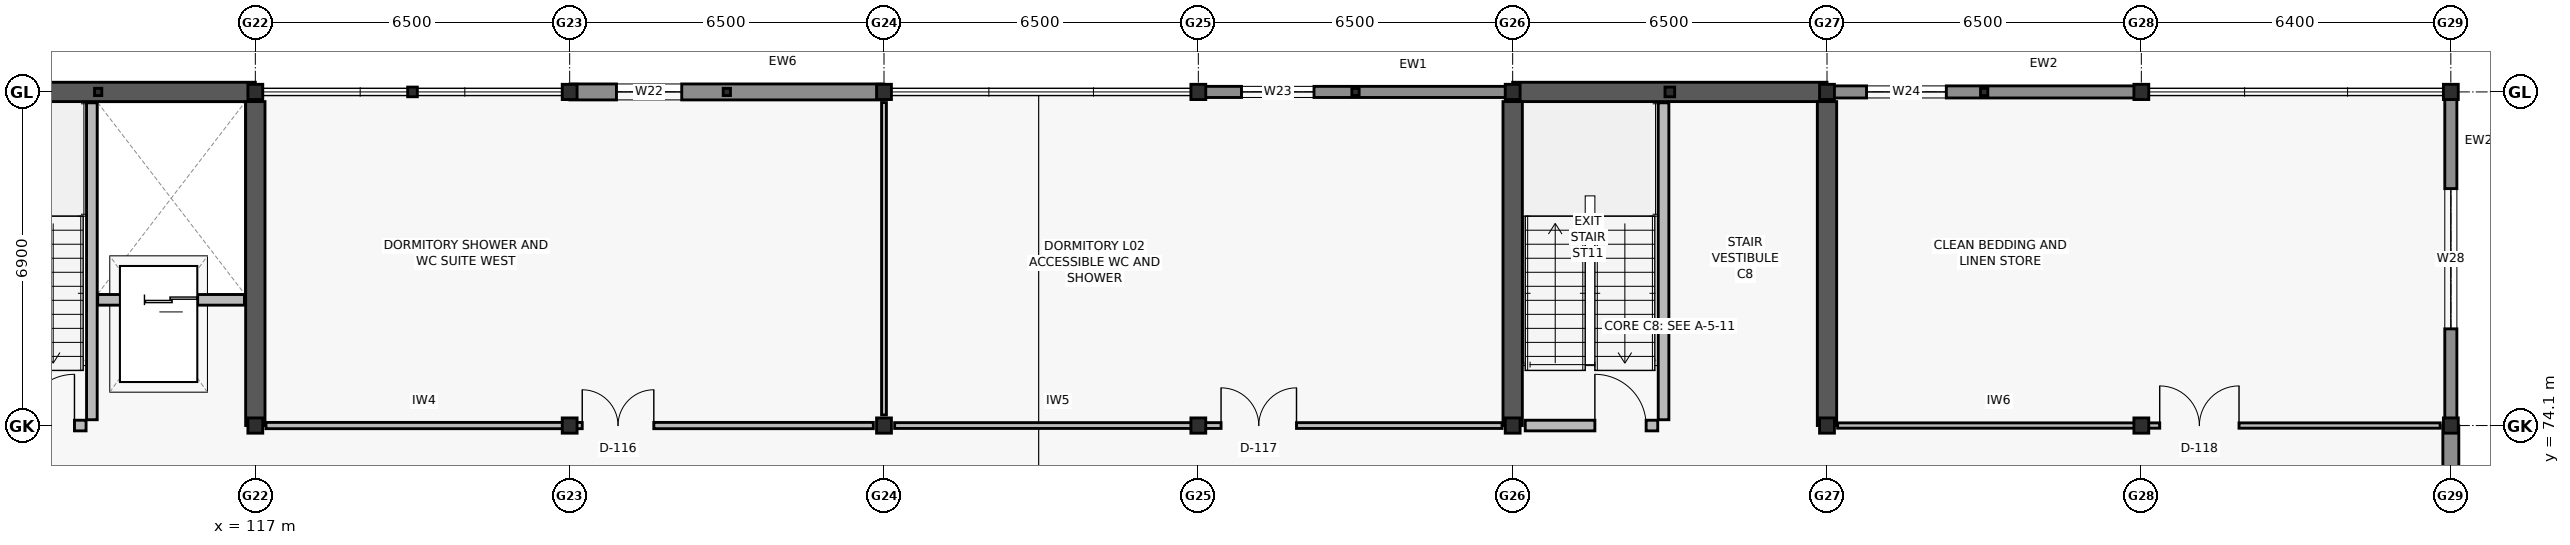
"""IFC4 building model, lengths in metres.
Left out: names, types, materials, properties, quantities, classifications, styles, units other than length and angle.
Written with IfcOpenShell. Run it as: python <this file> out.ifc"""

import sys

from ifc_helpers import new_model, si_unit, direction, frame, frame_2d, origin, origin_2d, place, context, subcontext, project, spatial, rectangle, hollow_rectangle, i_section, extrude, element, fill, save


model = new_model("IFC4")
c1 = context("Model", 3, precision=1e-05, world=origin(), true_north=direction((0.0, 1.0)))
c2 = subcontext(c1, "Body", "Model", "MODEL_VIEW")
j1 = project(units=[si_unit("LENGTHUNIT", "METRE"), si_unit("PLANEANGLEUNIT", "RADIAN")], contexts=[c1])
p1 = place(None, origin())
s1 = spatial("IfcSite", under=j1, at=p1, CompositionType="ELEMENT")
p2 = place(p1, origin())
s2 = spatial("IfcBuilding", under=s1, at=p2, CompositionType="ELEMENT")
p3 = place(p2, frame((0.0, 0.0, 9.6)))
s3 = spatial("IfcBuildingStorey", under=s2, at=p3, CompositionType="ELEMENT", Elevation=9.6)
for number, where, z_axis, x_axis in (
    (1, (117.0, 74.1, 0.0), (0.0, 0.0, 1.0), (1.0, 0.0, 0.0)),
    (2, (117.0, 81.0, 0.0), (0.0, 0.0, 1.0), (1.0, 0.0, 0.0)),
    (3, (123.5, 74.1, 0.0), (0.0, 0.0, 1.0), (1.0, 0.0, 0.0)),
    (4, (123.5, 81.0, 0.0), (0.0, 0.0, 1.0), (1.0, 0.0, 0.0)),
    (5, (130.0, 74.1, 0.0), (0.0, 0.0, 1.0), (1.0, 0.0, 0.0)),
    (6, (130.0, 81.0, 0.0), (0.0, 0.0, 1.0), (1.0, 0.0, 0.0)),
    (7, (136.5, 74.1, 0.0), (0.0, 0.0, 1.0), (1.0, 0.0, 0.0)),
    (8, (136.5, 81.0, 0.0), (0.0, 0.0, 1.0), (1.0, 0.0, 0.0)),
    (9, (143.0, 74.1, 0.0), (0.0, 0.0, 1.0), (1.0, 0.0, 0.0)),
    (10, (143.0, 81.0, 0.0), (0.0, 0.0, 1.0), (1.0, 0.0, 0.0)),
    (11, (149.5, 74.1, 0.0), (0.0, 0.0, 1.0), (1.0, 0.0, 0.0)),
    (12, (149.5, 81.0, 0.0), (0.0, 0.0, 1.0), (1.0, 0.0, 0.0)),
    (13, (156.0, 74.1, 0.0), (0.0, 0.0, 1.0), (1.0, 0.0, 0.0)),
    (14, (156.0, 81.0, 0.0), (0.0, 0.0, 1.0), (1.0, 0.0, 0.0)),
    (15, (162.4, 74.1, 0.0), (0.0, 0.0, 1.0), (1.0, 0.0, 0.0)),
    (16, (162.4, 81.0, 0.0), (0.0, 0.0, 1.0), (1.0, 0.0, 0.0)),
):
    element("IfcColumn", number, at=place(p3, frame(where, z_axis=z_axis, x_axis=x_axis)), inside=s3, PredefinedType="COLUMN", context=c2, shape_type="SweptSolid", body=[
        extrude(i_section(OverallWidth=0.307, OverallDepth=0.315, WebThickness=0.012, FlangeThickness=0.019, FilletRadius=0.017, at=origin_2d()), origin(), (0.0, 0.0, 1.0), 3.9),
    ])
p4 = place(p3, frame((113.75, 81.0, 0.0), z_axis=(0.0, 0.0, 1.0), x_axis=(1.0, 0.0, 0.0)))
e17 = element("IfcColumn", 17, at=p4, inside=s3, PredefinedType="PILASTER", context=c2, shape_type="SweptSolid", body=[
    extrude(hollow_rectangle(XDim=0.15, YDim=0.15, WallThickness=0.009, at=origin_2d()), origin(), (0.0, 0.0, 1.0), 3.9),
])
p5 = place(p3, frame((120.25, 81.0, 0.0), z_axis=(0.0, 0.0, 1.0), x_axis=(1.0, 0.0, 0.0)))
e18 = element("IfcColumn", 18, at=p5, inside=s3, PredefinedType="PILASTER", context=c2, shape_type="SweptSolid", body=[
    extrude(hollow_rectangle(XDim=0.2, YDim=0.2, WallThickness=0.01, at=origin_2d()), origin(), (0.0, 0.0, 1.0), 3.9),
])
for number, where, z_axis, x_axis in (
    (19, (126.75, 81.0, 0.0), (0.0, 0.0, 1.0), (1.0, 0.0, 0.0)),
    (20, (139.75, 81.0, 0.0), (0.0, 0.0, 1.0), (1.0, 0.0, 0.0)),
):
    element("IfcColumn", number, at=place(p3, frame(where, z_axis=z_axis, x_axis=x_axis)), inside=s3, PredefinedType="PILASTER", context=c2, shape_type="SweptSolid", body=[
        extrude(hollow_rectangle(XDim=0.15, YDim=0.15, WallThickness=0.009, at=origin_2d()), origin(), (0.0, 0.0, 1.0), 3.9),
    ])
p6 = place(p3, frame((146.25, 81.0, 0.0), z_axis=(0.0, 0.0, 1.0), x_axis=(1.0, 0.0, 0.0)))
e21 = element("IfcColumn", 21, at=p6, inside=s3, PredefinedType="PILASTER", context=c2, shape_type="SweptSolid", body=[
    extrude(hollow_rectangle(XDim=0.2, YDim=0.2, WallThickness=0.01, at=origin_2d()), origin(), (0.0, 0.0, 1.0), 3.9),
])
p7 = place(p3, frame((152.75, 81.0, 0.0), z_axis=(0.0, 0.0, 1.0), x_axis=(1.0, 0.0, 0.0)))
e22 = element("IfcColumn", 22, at=p7, inside=s3, PredefinedType="PILASTER", context=c2, shape_type="SweptSolid", body=[
    extrude(hollow_rectangle(XDim=0.15, YDim=0.15, WallThickness=0.009, at=origin_2d()), origin(), (0.0, 0.0, 1.0), 3.9),
])
p8 = place(p3, frame((110.5, 81.0, 0.0), z_axis=(0.0, 0.0, 1.0), x_axis=(1.0, 0.0, 0.0)))
e23 = element("IfcWall", 23, at=p8, inside=s3, PredefinedType="SHEAR", context=c2, shape_type="SweptSolid", body=[
    extrude(rectangle(XDim=6.5, YDim=0.4, at=frame_2d((3.25, 0.0))), origin(), (0.0, 0.0, 1.0), 3.66),
])
p9 = place(p3, frame((117.0, 74.1, 0.0), z_axis=(0.0, 0.0, 1.0), x_axis=(0.0, 1.0, 0.0)))
e24 = element("IfcWall", 24, at=p9, inside=s3, PredefinedType="SHEAR", context=c2, shape_type="SweptSolid", body=[
    extrude(rectangle(XDim=6.7, YDim=0.4, at=frame_2d((3.35, 0.0))), origin(), (0.0, 0.0, 1.0), 3.66),
])
p10 = place(p3, frame((143.0, 81.0, 0.0), z_axis=(0.0, 0.0, 1.0), x_axis=(1.0, 0.0, 0.0)))
e25 = element("IfcWall", 25, at=p10, inside=s3, PredefinedType="SHEAR", context=c2, shape_type="SweptSolid", body=[
    extrude(rectangle(XDim=6.5, YDim=0.4, at=frame_2d((3.25, 0.0))), origin(), (0.0, 0.0, 1.0), 3.66),
])
for number, where, z_axis, x_axis in (
    (26, (143.0, 74.1, 0.0), (0.0, 0.0, 1.0), (0.0, 1.0, 0.0)),
    (27, (149.5, 74.1, 0.0), (0.0, 0.0, 1.0), (0.0, 1.0, 0.0)),
):
    element("IfcWall", number, at=place(p3, frame(where, z_axis=z_axis, x_axis=x_axis)), inside=s3, PredefinedType="SHEAR", context=c2, shape_type="SweptSolid", body=[
        extrude(rectangle(XDim=6.7, YDim=0.4, at=frame_2d((3.35, 0.0))), origin(), (0.0, 0.0, 1.0), 3.66),
    ])
p11 = place(p3, frame((123.505, 81.0, 0.0), z_axis=(0.0, 0.0, 1.0), x_axis=(1.0, 0.0, 0.0)))
e28 = element("IfcWall", 28, at=p11, inside=s3, PredefinedType="SOLIDWALL", context=c2, shape_type="SweptSolid", body=[
    extrude(rectangle(XDim=6.49, YDim=0.33, at=frame_2d((3.245, 0.0))), origin(), (0.0, 0.0, 1.0), 3.02),
])
p12 = place(p11, frame((0.962, 0.0, 0.8)))
e29 = element("IfcOpeningElement", 29, at=p12, cuts=e28, PredefinedType="OPENING", context=c2, shape_type="SweptSolid", body=[
    extrude(rectangle(XDim=1.35, YDim=2.05, at=frame_2d((0.675, 1.025))), frame((0.0, 0.175, 0.0), z_axis=(0.0, -1.0, 0.0), x_axis=(1.0, 0.0, 0.0)), (0.0, 0.0, 1.0), 0.35),
])
p13 = place(p3, frame((136.505, 81.0, 0.0), z_axis=(0.0, 0.0, 1.0), x_axis=(1.0, 0.0, 0.0)))
e30 = element("IfcWall", 30, at=p13, inside=s3, PredefinedType="SOLIDWALL", context=c2, shape_type="SweptSolid", body=[
    extrude(rectangle(XDim=6.49, YDim=0.23, at=frame_2d((3.245, 0.0))), origin(), (0.0, 0.0, 1.0), 3.02),
])
p14 = place(p13, frame((0.887, 0.0, 0.8)))
e31 = element("IfcOpeningElement", 31, at=p14, cuts=e30, PredefinedType="OPENING", context=c2, shape_type="SweptSolid", body=[
    extrude(rectangle(XDim=1.5, YDim=2.05, at=frame_2d((0.75, 1.025))), frame((0.0, 0.125, 0.0), z_axis=(0.0, -1.0, 0.0), x_axis=(1.0, 0.0, 0.0)), (0.0, 0.0, 1.0), 0.25),
])
p15 = place(p3, frame((149.505, 81.0, 0.0), z_axis=(0.0, 0.0, 1.0), x_axis=(1.0, 0.0, 0.0)))
e32 = element("IfcWall", 32, at=p15, inside=s3, PredefinedType="SOLIDWALL", context=c2, shape_type="SweptSolid", body=[
    extrude(rectangle(XDim=6.49, YDim=0.25, at=frame_2d((3.245, 0.0))), origin(), (0.0, 0.0, 1.0), 3.02),
])
p16 = place(p15, frame((0.812, 0.0, 0.8)))
e33 = element("IfcOpeningElement", 33, at=p16, cuts=e32, PredefinedType="OPENING", context=c2, shape_type="SweptSolid", body=[
    extrude(rectangle(XDim=1.65, YDim=2.05, at=frame_2d((0.825, 1.025))), frame((0.0, 0.135, 0.0), z_axis=(0.0, -1.0, 0.0), x_axis=(1.0, 0.0, 0.0)), (0.0, 0.0, 1.0), 0.27),
])
p17 = place(p3, frame((162.4, 74.095, 0.0), z_axis=(0.0, 0.0, 1.0), x_axis=(0.0, -1.0, 0.0)))
e34 = element("IfcWall", 34, at=p17, inside=s3, PredefinedType="SOLIDWALL", context=c2, shape_type="SweptSolid", body=[
    extrude(rectangle(XDim=6.89, YDim=0.33, at=frame_2d((3.445, 0.0))), origin(), (0.0, 0.0, 1.0), 3.02),
])
p18 = place(p17, frame((3.478, 0.0, 0.8)))
e35 = element("IfcOpeningElement", 35, at=p18, cuts=e34, PredefinedType="OPENING", context=c2, shape_type="SweptSolid", body=[
    extrude(rectangle(XDim=2.5, YDim=1.15, at=frame_2d((1.25, 0.575))), frame((0.0, 0.175, 0.0), z_axis=(0.0, -1.0, 0.0), x_axis=(1.0, 0.0, 0.0)), (0.0, 0.0, 1.0), 0.35),
])
p19 = place(p3, frame((162.4, 80.995, 0.0), z_axis=(0.0, 0.0, 1.0), x_axis=(0.0, -1.0, 0.0)))
e36 = element("IfcWall", 36, at=p19, inside=s3, PredefinedType="SOLIDWALL", context=c2, shape_type="SweptSolid", body=[
    extrude(rectangle(XDim=6.89, YDim=0.25, at=frame_2d((3.445, 0.0))), origin(), (0.0, 0.0, 1.0), 3.02),
])
p20 = place(p19, frame((1.995, 0.0, 0.8)))
e37 = element("IfcOpeningElement", 37, at=p20, cuts=e36, PredefinedType="OPENING", context=c2, shape_type="SweptSolid", body=[
    extrude(rectangle(XDim=2.9, YDim=1.15, at=frame_2d((1.45, 0.575))), frame((0.0, 0.135, 0.0), z_axis=(0.0, -1.0, 0.0), x_axis=(1.0, 0.0, 0.0)), (0.0, 0.0, 1.0), 0.27),
])
p21 = place(p3, frame((113.62, 74.22, 0.0), z_axis=(0.0, 0.0, 1.0), x_axis=(0.0, 1.0, 0.0)))
e38 = element("IfcWall", 38, at=p21, inside=s3, PredefinedType="SOLIDWALL", context=c2, shape_type="SweptSolid", body=[
    extrude(rectangle(XDim=6.555, YDim=0.22, at=frame_2d((3.277, 0.0))), origin(), (0.0, 0.0, 1.0), 3.66),
])
p22 = place(p3, frame((110.76, 74.1, 0.0), z_axis=(0.0, 0.0, 1.0), x_axis=(1.0, 0.0, 0.0)))
e39 = element("IfcWall", 39, at=p22, inside=s3, PredefinedType="SOLIDWALL", context=c2, shape_type="SweptSolid", body=[
    extrude(rectangle(XDim=2.74, YDim=0.22, at=frame_2d((1.37, 0.0))), origin(), (0.0, 0.0, 1.0), 3.02),
])
p23 = place(p22, frame((1.44, 0.0, 0.0)))
e40 = element("IfcOpeningElement", 40, at=p23, cuts=e39, PredefinedType="OPENING", context=c2, shape_type="SweptSolid", body=[
    extrude(rectangle(XDim=1.06, YDim=2.1, at=frame_2d((0.53, 1.05))), frame((0.0, 0.12, 0.0), z_axis=(0.0, -1.0, 0.0), x_axis=(1.0, 0.0, 0.0)), (0.0, 0.0, 1.0), 0.24),
])
p24 = place(p3, frame((113.74, 76.7, 0.0), z_axis=(0.0, 0.0, 1.0), x_axis=(1.0, 0.0, 0.0)))
e41 = element("IfcWall", 41, at=p24, inside=s3, PredefinedType="SOLIDWALL", context=c2, shape_type="SweptSolid", body=[
    extrude(rectangle(XDim=3.035, YDim=0.22, at=frame_2d((1.518, 0.0))), origin(), (0.0, 0.0, 1.0), 3.66),
])
p25 = place(p24, frame((0.968, 0.0, 0.0)))
e42 = element("IfcOpeningElement", 42, at=p25, cuts=e41, PredefinedType="OPENING", context=c2, shape_type="SweptSolid", body=[
    extrude(rectangle(XDim=1.1, YDim=2.1, at=frame_2d((0.55, 1.05))), frame((0.0, 0.12, 0.0), z_axis=(0.0, -1.0, 0.0), x_axis=(1.0, 0.0, 0.0)), (0.0, 0.0, 1.0), 0.24),
])
p26 = place(p3, frame((146.12, 74.22, 0.0), z_axis=(0.0, 0.0, 1.0), x_axis=(0.0, 1.0, 0.0)))
e43 = element("IfcWall", 43, at=p26, inside=s3, PredefinedType="SOLIDWALL", context=c2, shape_type="SweptSolid", body=[
    extrude(rectangle(XDim=6.555, YDim=0.22, at=frame_2d((3.277, 0.0))), origin(), (0.0, 0.0, 1.0), 3.66),
])
p27 = place(p3, frame((143.26, 74.1, 0.0), z_axis=(0.0, 0.0, 1.0), x_axis=(1.0, 0.0, 0.0)))
e44 = element("IfcWall", 44, at=p27, inside=s3, PredefinedType="SOLIDWALL", context=c2, shape_type="SweptSolid", body=[
    extrude(rectangle(XDim=2.74, YDim=0.22, at=frame_2d((1.37, 0.0))), origin(), (0.0, 0.0, 1.0), 3.02),
])
p28 = place(p27, frame((1.44, 0.0, 0.0)))
e45 = element("IfcOpeningElement", 45, at=p28, cuts=e44, PredefinedType="OPENING", context=c2, shape_type="SweptSolid", body=[
    extrude(rectangle(XDim=1.06, YDim=2.1, at=frame_2d((0.53, 1.05))), frame((0.0, 0.12, 0.0), z_axis=(0.0, -1.0, 0.0), x_axis=(1.0, 0.0, 0.0)), (0.0, 0.0, 1.0), 0.24),
])
p29 = place(p3, frame((117.22, 74.1, 0.0), z_axis=(0.0, 0.0, 1.0), x_axis=(1.0, 0.0, 0.0)))
e46 = element("IfcWall", 46, at=p29, inside=s3, PredefinedType="PARTITIONING", context=c2, shape_type="SweptSolid", body=[
    extrude(rectangle(XDim=12.56, YDim=0.13, at=frame_2d((6.28, 0.0))), origin(), (0.0, 0.0, 1.0), 3.0),
])
p30 = place(p29, frame((6.54, 0.0, 0.0)))
e47 = element("IfcOpeningElement", 47, at=p30, cuts=e46, PredefinedType="OPENING", context=c2, shape_type="SweptSolid", body=[
    extrude(rectangle(XDim=1.48, YDim=2.18, at=frame_2d((0.74, 1.09))), frame((0.0, 0.075, 0.0), z_axis=(0.0, -1.0, 0.0), x_axis=(1.0, 0.0, 0.0)), (0.0, 0.0, 1.0), 0.15),
])
p31 = place(p3, frame((130.22, 74.1, 0.0), z_axis=(0.0, 0.0, 1.0), x_axis=(1.0, 0.0, 0.0)))
e48 = element("IfcWall", 48, at=p31, inside=s3, PredefinedType="PARTITIONING", context=c2, shape_type="SweptSolid", body=[
    extrude(rectangle(XDim=12.56, YDim=0.12, at=frame_2d((6.28, 0.0))), origin(), (0.0, 0.0, 1.0), 3.0),
])
p32 = place(p31, frame((6.75, 0.0, 0.0)))
e49 = element("IfcOpeningElement", 49, at=p32, cuts=e48, PredefinedType="OPENING", context=c2, shape_type="SweptSolid", body=[
    extrude(rectangle(XDim=1.56, YDim=2.18, at=frame_2d((0.78, 1.09))), frame((0.0, 0.07, 0.0), z_axis=(0.0, -1.0, 0.0), x_axis=(1.0, 0.0, 0.0)), (0.0, 0.0, 1.0), 0.14),
])
p33 = place(p3, frame((149.72, 74.1, 0.0), z_axis=(0.0, 0.0, 1.0), x_axis=(1.0, 0.0, 0.0)))
e50 = element("IfcWall", 50, at=p33, inside=s3, PredefinedType="PARTITIONING", context=c2, shape_type="SweptSolid", body=[
    extrude(rectangle(XDim=12.46, YDim=0.11, at=frame_2d((6.23, 0.0))), origin(), (0.0, 0.0, 1.0), 3.0),
])
p34 = place(p33, frame((6.66, 0.0, 0.0)))
e51 = element("IfcOpeningElement", 51, at=p34, cuts=e50, PredefinedType="OPENING", context=c2, shape_type="SweptSolid", body=[
    extrude(rectangle(XDim=1.64, YDim=2.2, at=frame_2d((0.82, 1.1))), frame((0.0, 0.065, 0.0), z_axis=(0.0, -1.0, 0.0), x_axis=(1.0, 0.0, 0.0)), (0.0, 0.0, 1.0), 0.13),
])
p35 = place(p3, frame((130.0, 74.32, 0.0), z_axis=(0.0, 0.0, 1.0), x_axis=(0.0, 1.0, 0.0)))
e52 = element("IfcWall", 52, at=p35, inside=s3, PredefinedType="PARTITIONING", context=c2, shape_type="SweptSolid", body=[
    extrude(rectangle(XDim=6.46, YDim=0.1, at=frame_2d((3.23, 0.0))), origin(), (0.0, 0.0, 1.0), 3.0),
])
p36 = place(p12, origin())
e53 = element("IfcWindow", 53, at=p36, inside=s3, PartitioningType="SINGLE_PANEL", PredefinedType="WINDOW", context=c2, shape_type="SweptSolid", body=[
    extrude(rectangle(XDim=1.35, YDim=2.05, at=frame_2d((0.675, 1.025))), frame((0.0, 0.03, 0.0), z_axis=(0.0, -1.0, 0.0), x_axis=(1.0, 0.0, 0.0)), (0.0, 0.0, 1.0), 0.06),
])
fill(e29, e53)
p37 = place(p14, origin())
e54 = element("IfcWindow", 54, at=p37, inside=s3, PartitioningType="SINGLE_PANEL", PredefinedType="WINDOW", context=c2, shape_type="SweptSolid", body=[
    extrude(rectangle(XDim=1.5, YDim=2.05, at=frame_2d((0.75, 1.025))), frame((0.0, 0.03, 0.0), z_axis=(0.0, -1.0, 0.0), x_axis=(1.0, 0.0, 0.0)), (0.0, 0.0, 1.0), 0.06),
])
fill(e31, e54)
p38 = place(p16, origin())
e55 = element("IfcWindow", 55, at=p38, inside=s3, PartitioningType="DOUBLE_PANEL_VERTICAL", PredefinedType="WINDOW", context=c2, shape_type="SweptSolid", body=[
    extrude(rectangle(XDim=1.65, YDim=2.05, at=frame_2d((0.825, 1.025))), frame((0.0, 0.03, 0.0), z_axis=(0.0, -1.0, 0.0), x_axis=(1.0, 0.0, 0.0)), (0.0, 0.0, 1.0), 0.06),
])
fill(e33, e55)
p39 = place(p20, origin())
e56 = element("IfcWindow", 56, at=p39, inside=s3, PartitioningType="TRIPLE_PANEL_VERTICAL", PredefinedType="WINDOW", context=c2, shape_type="SweptSolid", body=[
    extrude(rectangle(XDim=2.9, YDim=1.15, at=frame_2d((1.45, 0.575))), frame((0.0, 0.03, 0.0), z_axis=(0.0, -1.0, 0.0), x_axis=(1.0, 0.0, 0.0)), (0.0, 0.0, 1.0), 0.06),
])
fill(e37, e56)
p40 = place(p23, origin())
e57 = element("IfcDoor", 57, at=p40, inside=s3, OperationType="SINGLE_SWING_RIGHT", PredefinedType="DOOR", context=c2, shape_type="SweptSolid", body=[
    extrude(rectangle(XDim=1.06, YDim=2.1, at=frame_2d((0.53, 1.05))), frame((0.0, 0.025, 0.0), z_axis=(0.0, -1.0, 0.0), x_axis=(1.0, 0.0, 0.0)), (0.0, 0.0, 1.0), 0.05),
])
fill(e40, e57)
p41 = place(p25, origin())
e58 = element("IfcDoor", 58, at=p41, inside=s3, OperationType="DOUBLE_DOOR_SLIDING", PredefinedType="DOOR", context=c2, shape_type="SweptSolid", body=[
    extrude(rectangle(XDim=1.1, YDim=2.1, at=frame_2d((0.55, 1.05))), frame((0.0, 0.025, 0.0), z_axis=(0.0, -1.0, 0.0), x_axis=(1.0, 0.0, 0.0)), (0.0, 0.0, 1.0), 0.05),
])
fill(e42, e58)
p42 = place(p28, origin())
e59 = element("IfcDoor", 59, at=p42, inside=s3, OperationType="SINGLE_SWING_LEFT", PredefinedType="DOOR", context=c2, shape_type="SweptSolid", body=[
    extrude(rectangle(XDim=1.06, YDim=2.1, at=frame_2d((0.53, 1.05))), frame((0.0, 0.025, 0.0), z_axis=(0.0, -1.0, 0.0), x_axis=(1.0, 0.0, 0.0)), (0.0, 0.0, 1.0), 0.05),
])
fill(e45, e59)
p43 = place(p30, origin())
e60 = element("IfcDoor", 60, at=p43, inside=s3, OperationType="DOUBLE_DOOR_SINGLE_SWING", PredefinedType="DOOR", context=c2, shape_type="SweptSolid", body=[
    extrude(rectangle(XDim=1.48, YDim=2.18, at=frame_2d((0.74, 1.09))), frame((0.0, 0.025, 0.0), z_axis=(0.0, -1.0, 0.0), x_axis=(1.0, 0.0, 0.0)), (0.0, 0.0, 1.0), 0.05),
])
fill(e47, e60)
p44 = place(p32, origin())
e61 = element("IfcDoor", 61, at=p44, inside=s3, OperationType="DOUBLE_DOOR_SINGLE_SWING", PredefinedType="DOOR", context=c2, shape_type="SweptSolid", body=[
    extrude(rectangle(XDim=1.56, YDim=2.18, at=frame_2d((0.78, 1.09))), frame((0.0, 0.025, 0.0), z_axis=(0.0, -1.0, 0.0), x_axis=(1.0, 0.0, 0.0)), (0.0, 0.0, 1.0), 0.05),
])
fill(e49, e61)
p45 = place(p34, origin())
e62 = element("IfcDoor", 62, at=p45, inside=s3, OperationType="DOUBLE_DOOR_SINGLE_SWING", PredefinedType="DOOR", context=c2, shape_type="SweptSolid", body=[
    extrude(rectangle(XDim=1.64, YDim=2.2, at=frame_2d((0.82, 1.1))), frame((0.0, 0.025, 0.0), z_axis=(0.0, -1.0, 0.0), x_axis=(1.0, 0.0, 0.0)), (0.0, 0.0, 1.0), 0.05),
])
fill(e51, e62)
save(model, sys.argv[1])
